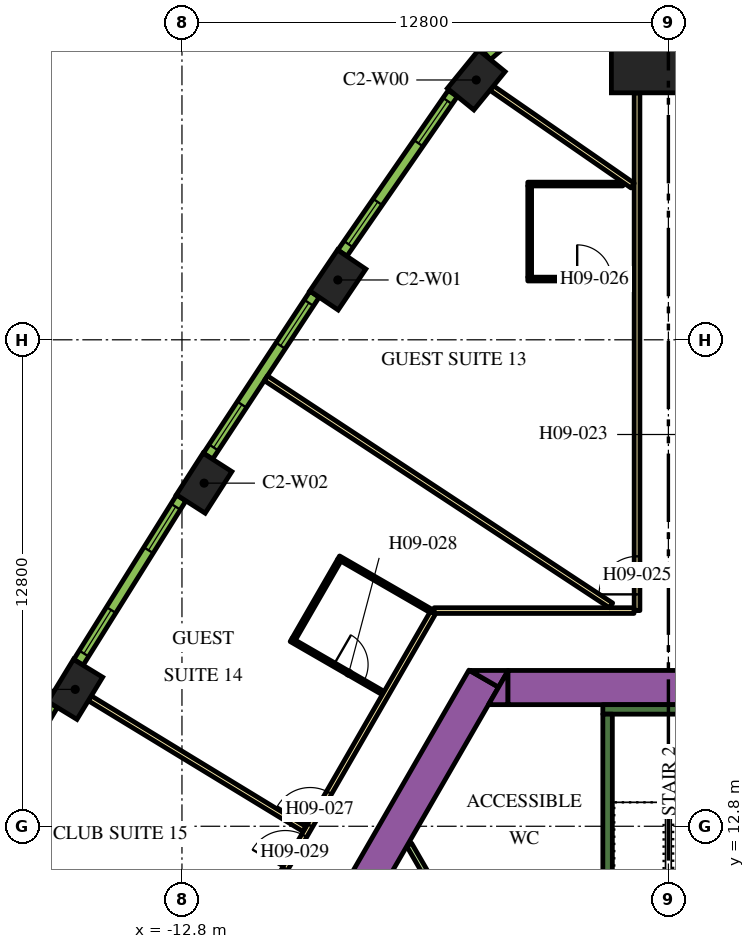
"""IFC4 building model, lengths in metres.
Left out: names, types, materials, properties, quantities, classifications, styles, units other than length and angle.
Written with IfcOpenShell. Run it as: python <this file> out.ifc"""

import sys

from ifc_helpers import new_model, si_unit, direction, frame, frame_2d, origin, origin_2d, place, context, subcontext, project, spatial, polyline, rectangle, outline, extrude, element, fill, save


model = new_model("IFC4")
c1 = context("Model", 3, precision=1e-05, world=origin(), true_north=direction((0.0, 1.0)))
c2 = subcontext(c1, "Body", "Model", "MODEL_VIEW")
j1 = project(units=[si_unit("LENGTHUNIT", "METRE"), si_unit("PLANEANGLEUNIT", "RADIAN")], contexts=[c1])
p1 = place(None, origin())
s1 = spatial("IfcSite", under=j1, at=p1, CompositionType="ELEMENT")
p2 = place(p1, origin())
s2 = spatial("IfcBuilding", under=s1, at=p2, CompositionType="ELEMENT")
p3 = place(p2, frame((0.0, 0.0, 118.8)))
s3 = spatial("IfcBuildingStorey", under=s2, at=p3, CompositionType="ELEMENT", Elevation=118.8)
p4 = place(p3, frame((0.0, 33.598, 0.0), z_axis=(0.0, 0.0, 1.0), x_axis=(0.0, 1.0, 0.0)))
e1 = element("IfcColumn", 1, at=p4, inside=s3, PredefinedType="COLUMN", context=c2, shape_type="SweptSolid", body=[
    extrude(rectangle(XDim=3.0, YDim=3.0, at=origin_2d()), origin(), (0.0, 0.0, 1.0), 3.9),
])
for number, where, z_axis, x_axis in (
    (2, (-5.056, 32.437, 0.0), (0.0, 0.0, 1.0), (-0.632, -0.775, 0.0)),
    (3, (-8.699, 27.174, 0.0), (0.0, 0.0, 1.0), (-0.559, -0.829, 0.0)),
    (4, (-12.217, 21.828, 0.0), (0.0, 0.0, 1.0), (-0.54, -0.842, 0.0)),
    (5, (-15.609, 16.402, 0.0), (0.0, 0.0, 1.0), (-0.52, -0.854, 0.0)),
):
    element("IfcColumn", number, at=place(p3, frame(where, z_axis=z_axis, x_axis=x_axis)), inside=s3, PredefinedType="COLUMN", context=c2, shape_type="SweptSolid", body=[
        extrude(rectangle(XDim=1.3, YDim=0.9, at=origin_2d()), origin(), (0.0, 0.0, 1.0), 3.9),
    ])
p5 = place(p3, frame((-15.36, -1.503, 0.0), z_axis=(0.0, 0.0, 1.0), x_axis=(0.50000389221, 0.866023156604, 0.0)))
e6 = element("IfcWall", 6, at=p5, inside=s3, PredefinedType="SOLIDWALL", context=c2, shape_type="SweptSolid", body=[
    extrude(rectangle(XDim=21.0, YDim=0.9, at=frame_2d((10.5, 0.0))), origin(), (0.0, 0.0, 1.0), 3.9),
])
p6 = place(p3, origin())
e7 = element("IfcWall", 7, at=p6, inside=s3, PredefinedType="SOLIDWALL", context=c2, shape_type="SweptSolid", body=[
    extrude(outline(polyline([(-4.215, 16.9), (-4.469, 16.46), (-5.231, 16.9), (-4.215, 16.9)])), origin(), (0.0, 0.0, 1.0), 3.9),
])
p7 = place(p3, frame((-4.224, 16.45, 0.0), z_axis=(0.0, 0.0, 1.0), x_axis=(1.0, 0.0, 0.0)))
e8 = element("IfcWall", 8, at=p7, inside=s3, PredefinedType="SOLIDWALL", context=c2, shape_type="SweptSolid", body=[
    extrude(rectangle(XDim=9.488, YDim=0.9, at=frame_2d((4.744, 0.0))), origin(), (0.0, 0.0, 1.0), 3.9),
])
e9 = element("IfcWall", 9, at=p6, inside=s3, PredefinedType="SOLIDWALL", context=c2, shape_type="SweptSolid", body=[
    extrude(outline(polyline([(-4.734, 16.0), (-4.226, 16.88), (-4.226, 16.0), (-4.734, 16.0)])), origin(), (0.0, 0.0, 1.0), 3.9),
])
p8 = place(p3, frame((-1.725, 15.875, 0.0), z_axis=(0.0, 0.0, 1.0), x_axis=(1.0, 0.0, 0.0)))
e10 = element("IfcWall", 10, at=p8, inside=s3, PredefinedType="SOLIDWALL", context=c2, shape_type="SweptSolid", body=[
    extrude(rectangle(XDim=3.45, YDim=0.25, at=frame_2d((1.725, 0.0))), origin(), (0.0, 0.0, 1.0), 3.9),
])
p9 = place(p3, frame((-1.6, 8.7, 0.0), z_axis=(0.0, 0.0, 1.0), x_axis=(0.0, 1.0, 0.0)))
e11 = element("IfcWall", 11, at=p9, inside=s3, PredefinedType="SOLIDWALL", context=c2, shape_type="SweptSolid", body=[
    extrude(rectangle(XDim=7.05, YDim=0.25, at=frame_2d((3.525, 0.0))), origin(), (0.0, 0.0, 1.0), 3.9),
])
p10 = place(p3, frame((-6.823, 12.318, 0.0), z_axis=(0.0, 0.0, 1.0), x_axis=(0.500007885066, -0.866020851292, 0.0)))
e12 = element("IfcWall", 12, at=p10, inside=s3, PredefinedType="PARTITIONING", context=c2, shape_type="SweptSolid", body=[
    extrude(rectangle(XDim=4.072, YDim=0.15, at=frame_2d((2.036, 0.0))), origin(), (0.0, 0.0, 1.0), 2.75),
])
p11 = place(p3, frame((-0.825, 18.475, 0.0), z_axis=(0.0, 0.0, 1.0), x_axis=(0.0, 1.0, 0.0)))
e13 = element("IfcWall", 13, at=p11, inside=s3, PredefinedType="PARTITIONING", context=c2, shape_type="SweptSolid", body=[
    extrude(rectangle(XDim=13.623, YDim=0.15, at=frame_2d((6.812, 0.0))), origin(), (0.0, 0.0, 1.0), 2.75),
])
p12 = place(p11, frame((0.427, 0.0, 0.0)))
e14 = element("IfcOpeningElement", 14, at=p12, cuts=e13, PredefinedType="OPENING", context=c2, shape_type="SweptSolid", body=[
    extrude(rectangle(XDim=1.0, YDim=2.1, at=frame_2d((0.5, 1.05))), frame((0.0, 0.085, 0.0), z_axis=(0.0, -1.0, 0.0), x_axis=(1.0, 0.0, 0.0)), (0.0, 0.0, 1.0), 0.17),
])
p13 = place(p3, frame((-6.163, 18.475, 0.0), z_axis=(0.0, 0.0, 1.0), x_axis=(1.0, 0.0, 0.0)))
e15 = element("IfcWall", 15, at=p13, inside=s3, PredefinedType="PARTITIONING", context=c2, shape_type="SweptSolid", body=[
    extrude(rectangle(XDim=5.258, YDim=0.15, at=frame_2d((2.629, 0.0))), origin(), (0.0, 0.0, 1.0), 2.75),
])
p14 = place(p3, frame((-19.081, -3.9, 0.0), z_axis=(0.0, 0.0, 1.0), x_axis=(0.499998313975, 0.866026377209, 0.0)))
e16 = element("IfcWall", 16, at=p14, inside=s3, PredefinedType="PARTITIONING", context=c2, shape_type="SweptSolid", body=[
    extrude(rectangle(XDim=25.766, YDim=0.15, at=frame_2d((12.883, 0.0))), origin(), (0.0, 0.0, 1.0), 2.75),
])
p15 = place(p14, frame((19.306, 0.0, 0.0)))
e17 = element("IfcOpeningElement", 17, at=p15, cuts=e16, PredefinedType="OPENING", context=c2, shape_type="SweptSolid", body=[
    extrude(rectangle(XDim=1.0, YDim=2.1, at=frame_2d((0.5, 1.05))), frame((0.0, 0.085, 0.0), z_axis=(0.0, -1.0, 0.0), x_axis=(1.0, 0.0, 0.0)), (0.0, 0.0, 1.0), 0.17),
])
p16 = place(p14, frame((18.0, 0.0, 0.0)))
e18 = element("IfcOpeningElement", 18, at=p16, cuts=e16, PredefinedType="OPENING", context=c2, shape_type="SweptSolid", body=[
    extrude(rectangle(XDim=1.0, YDim=2.1, at=frame_2d((0.5, 1.05))), frame((0.0, 0.085, 0.0), z_axis=(0.0, -1.0, 0.0), x_axis=(1.0, 0.0, 0.0)), (0.0, 0.0, 1.0), 0.17),
])
p17 = place(p14, frame((7.793, 0.0, 0.0)))
e19 = element("IfcOpeningElement", 19, at=p17, cuts=e16, PredefinedType="OPENING", context=c2, shape_type="SweptSolid", body=[
    extrude(rectangle(XDim=0.9, YDim=2.1, at=frame_2d((0.45, 1.05))), frame((0.0, 0.085, 0.0), z_axis=(0.0, -1.0, 0.0), x_axis=(1.0, 0.0, 0.0)), (0.0, 0.0, 1.0), 0.17),
])
p18 = place(p14, frame((4.674, 0.0, 0.0)))
e20 = element("IfcOpeningElement", 20, at=p18, cuts=e16, PredefinedType="OPENING", context=c2, shape_type="SweptSolid", body=[
    extrude(rectangle(XDim=0.9, YDim=2.1, at=frame_2d((0.45, 1.05))), frame((0.0, 0.085, 0.0), z_axis=(0.0, -1.0, 0.0), x_axis=(1.0, 0.0, 0.0)), (0.0, 0.0, 1.0), 0.17),
])
p19 = place(p14, frame((0.18, 0.0, 0.0)))
e21 = element("IfcOpeningElement", 21, at=p19, cuts=e16, PredefinedType="OPENING", context=c2, shape_type="SweptSolid", body=[
    extrude(rectangle(XDim=1.0, YDim=2.1, at=frame_2d((0.5, 1.05))), frame((0.0, 0.085, 0.0), z_axis=(0.0, -1.0, 0.0), x_axis=(1.0, 0.0, 0.0)), (0.0, 0.0, 1.0), 0.17),
])
p20 = place(p3, frame((-15.225, 16.167, 0.0), z_axis=(0.0, 0.0, 1.0), x_axis=(0.854088713274, -0.520127359266, 0.0)))
e22 = element("IfcWall", 22, at=p20, inside=s3, PredefinedType="PARTITIONING", context=c2, shape_type="SweptSolid", body=[
    extrude(rectangle(XDim=6.611, YDim=0.15, at=frame_2d((3.305, 0.0))), origin(), (0.0, 0.0, 1.0), 2.75),
])
p21 = place(p3, frame((-10.592, 24.589, 0.0), z_axis=(0.0, 0.0, 1.0), x_axis=(0.835337323748, -0.549737715236, 0.0)))
e23 = element("IfcWall", 23, at=p21, inside=s3, PredefinedType="PARTITIONING", context=c2, shape_type="SweptSolid", body=[
    extrude(rectangle(XDim=10.875, YDim=0.15, at=frame_2d((5.438, 0.0))), origin(), (0.0, 0.0, 1.0), 2.75),
])
p22 = place(p3, frame((-4.649, 32.223, 0.0), z_axis=(0.0, 0.0, 1.0), x_axis=(0.822262349475, -0.569108626394, 0.0)))
e24 = element("IfcWall", 24, at=p22, inside=s3, PredefinedType="PARTITIONING", context=c2, shape_type="SweptSolid", body=[
    extrude(rectangle(XDim=4.51, YDim=0.15, at=frame_2d((2.255, 0.0))), origin(), (0.0, 0.0, 1.0), 2.75),
])
p23 = place(p3, frame((-3.7, 27.198, 0.0), z_axis=(0.0, 0.0, 1.0), x_axis=(1.0, 0.0, 0.0)))
e25 = element("IfcWall", 25, at=p23, inside=s3, PredefinedType="PARTITIONING", context=c2, shape_type="SweptSolid", body=[
    extrude(rectangle(XDim=2.8, YDim=0.1, at=frame_2d((1.4, 0.0))), origin(), (0.0, 0.0, 1.0), 2.75),
])
p24 = place(p23, frame((1.3, 0.0, 0.0)))
e26 = element("IfcOpeningElement", 26, at=p24, cuts=e25, PredefinedType="OPENING", context=c2, shape_type="SweptSolid", body=[
    extrude(rectangle(XDim=0.9, YDim=2.1, at=frame_2d((0.45, 1.05))), frame((0.0, 0.06, 0.0), z_axis=(0.0, -1.0, 0.0), x_axis=(1.0, 0.0, 0.0)), (0.0, 0.0, 1.0), 0.12),
])
p25 = place(p3, frame((-3.65, 27.248, 0.0), z_axis=(0.0, 0.0, 1.0), x_axis=(0.0, 1.0, 0.0)))
e27 = element("IfcWall", 27, at=p25, inside=s3, PredefinedType="PARTITIONING", context=c2, shape_type="SweptSolid", body=[
    extrude(rectangle(XDim=2.4, YDim=0.1, at=frame_2d((1.2, 0.0))), origin(), (0.0, 0.0, 1.0), 2.75),
])
p26 = place(p3, frame((-1.2, 29.698, 0.0), z_axis=(0.0, 0.0, 1.0), x_axis=(-1.0, 0.0, 0.0)))
e28 = element("IfcWall", 28, at=p26, inside=s3, PredefinedType="PARTITIONING", context=c2, shape_type="SweptSolid", body=[
    extrude(rectangle(XDim=2.5, YDim=0.1, at=frame_2d((1.25, 0.0))), origin(), (0.0, 0.0, 1.0), 2.75),
])
p27 = place(p3, frame((-9.928, 17.704, 0.0), z_axis=(0.0, 0.0, 1.0), x_axis=(0.866034573852, -0.49998411664, 0.0)))
e29 = element("IfcWall", 29, at=p27, inside=s3, PredefinedType="PARTITIONING", context=c2, shape_type="SweptSolid", body=[
    extrude(rectangle(XDim=2.8, YDim=0.1, at=frame_2d((1.4, 0.0))), origin(), (0.0, 0.0, 1.0), 2.75),
])
p28 = place(p27, frame((1.3, 0.0, 0.0)))
e30 = element("IfcOpeningElement", 30, at=p28, cuts=e29, PredefinedType="OPENING", context=c2, shape_type="SweptSolid", body=[
    extrude(rectangle(XDim=0.9, YDim=2.1, at=frame_2d((0.45, 1.05))), frame((0.0, 0.06, 0.0), z_axis=(0.0, -1.0, 0.0), x_axis=(1.0, 0.0, 0.0)), (0.0, 0.0, 1.0), 0.12),
])
p29 = place(p3, frame((-9.86, 17.722, 0.0), z_axis=(0.0, 0.0, 1.0), x_axis=(0.500001309137, 0.866024647952, 0.0)))
e31 = element("IfcWall", 31, at=p29, inside=s3, PredefinedType="PARTITIONING", context=c2, shape_type="SweptSolid", body=[
    extrude(rectangle(XDim=2.4, YDim=0.1, at=frame_2d((1.2, 0.0))), origin(), (0.0, 0.0, 1.0), 2.75),
])
p30 = place(p3, frame((-6.253, 18.469, 0.0), z_axis=(0.0, 0.0, 1.0), x_axis=(-0.866034573852, 0.49998411664, 0.0)))
e32 = element("IfcWall", 32, at=p30, inside=s3, PredefinedType="PARTITIONING", context=c2, shape_type="SweptSolid", body=[
    extrude(rectangle(XDim=2.8, YDim=0.1, at=frame_2d((1.4, 0.0))), origin(), (0.0, 0.0, 1.0), 2.75),
])
p31 = place(p3, frame((-3.405, 34.275, 0.0), z_axis=(0.0, 0.0, 1.0), x_axis=(-0.754882764627, -0.655859749999, 0.0)))
e33 = element("IfcWall", 33, at=p31, inside=s3, PredefinedType="SOLIDWALL", context=c2, shape_type="SweptSolid", body=[
    extrude(rectangle(XDim=1.82, YDim=0.29, at=frame_2d((0.91, 0.0))), origin(), (0.0, 0.0, 1.0), 3.65),
])
p32 = place(p31, frame((0.46, 0.0, 0.9)))
e34 = element("IfcOpeningElement", 34, at=p32, cuts=e33, PredefinedType="OPENING", context=c2, shape_type="SweptSolid", body=[
    extrude(rectangle(XDim=0.9, YDim=2.15, at=frame_2d((0.45, 1.075))), frame((0.0, 0.155, 0.0), z_axis=(0.0, -1.0, 0.0), x_axis=(1.0, 0.0, 0.0)), (0.0, 0.0, 1.0), 0.31),
])
p33 = place(p3, frame((-5.673, 32.081, 0.0), z_axis=(0.0, 0.0, 1.0), x_axis=(-0.569113019126, -0.822259309136, 0.0)))
e35 = element("IfcWall", 35, at=p33, inside=s3, PredefinedType="SOLIDWALL", context=c2, shape_type="SweptSolid", body=[
    extrude(rectangle(XDim=5.107, YDim=0.29, at=frame_2d((2.553, 0.0))), origin(), (0.0, 0.0, 1.0), 3.65),
])
p34 = place(p33, frame((0.24, 0.0, 0.9)))
e36 = element("IfcOpeningElement", 36, at=p34, cuts=e35, PredefinedType="OPENING", context=c2, shape_type="SweptSolid", body=[
    extrude(rectangle(XDim=1.35, YDim=2.15, at=frame_2d((0.675, 1.075))), frame((0.0, 0.155, 0.0), z_axis=(0.0, -1.0, 0.0), x_axis=(1.0, 0.0, 0.0)), (0.0, 0.0, 1.0), 0.31),
])
p35 = place(p33, frame((3.471, 0.0, 0.9)))
e37 = element("IfcOpeningElement", 37, at=p35, cuts=e35, PredefinedType="OPENING", context=c2, shape_type="SweptSolid", body=[
    extrude(rectangle(XDim=1.35, YDim=2.15, at=frame_2d((0.675, 1.075))), frame((0.0, 0.155, 0.0), z_axis=(0.0, -1.0, 0.0), x_axis=(1.0, 0.0, 0.0)), (0.0, 0.0, 1.0), 0.31),
])
p36 = place(p3, frame((-9.311, 26.799, 0.0), z_axis=(0.0, 0.0, 1.0), x_axis=(-0.549741341923, -0.835334937005, 0.0)))
e38 = element("IfcWall", 38, at=p36, inside=s3, PredefinedType="SOLIDWALL", context=c2, shape_type="SweptSolid", body=[
    extrude(rectangle(XDim=5.1, YDim=0.29, at=frame_2d((2.55, 0.0))), origin(), (0.0, 0.0, 1.0), 3.65),
])
p37 = place(p36, frame((0.273, 0.0, 0.9)))
e39 = element("IfcOpeningElement", 39, at=p37, cuts=e38, PredefinedType="OPENING", context=c2, shape_type="SweptSolid", body=[
    extrude(rectangle(XDim=1.35, YDim=2.15, at=frame_2d((0.675, 1.075))), frame((0.0, 0.155, 0.0), z_axis=(0.0, -1.0, 0.0), x_axis=(1.0, 0.0, 0.0)), (0.0, 0.0, 1.0), 0.31),
])
p38 = place(p36, frame((3.478, 0.0, 0.9)))
e40 = element("IfcOpeningElement", 40, at=p38, cuts=e38, PredefinedType="OPENING", context=c2, shape_type="SweptSolid", body=[
    extrude(rectangle(XDim=1.35, YDim=2.15, at=frame_2d((0.675, 1.075))), frame((0.0, 0.155, 0.0), z_axis=(0.0, -1.0, 0.0), x_axis=(1.0, 0.0, 0.0)), (0.0, 0.0, 1.0), 0.31),
])
p39 = place(p3, frame((-12.82, 21.439, 0.0), z_axis=(0.0, 0.0, 1.0), x_axis=(-0.530072082134, -0.847952585787, 0.0)))
e41 = element("IfcWall", 41, at=p39, inside=s3, PredefinedType="SOLIDWALL", context=c2, shape_type="SweptSolid", body=[
    extrude(rectangle(XDim=5.1, YDim=0.29, at=frame_2d((2.55, 0.0))), origin(), (0.0, 0.0, 1.0), 3.65),
])
p40 = place(p39, frame((0.273, 0.0, 0.9)))
e42 = element("IfcOpeningElement", 42, at=p40, cuts=e41, PredefinedType="OPENING", context=c2, shape_type="SweptSolid", body=[
    extrude(rectangle(XDim=1.35, YDim=2.15, at=frame_2d((0.675, 1.075))), frame((0.0, 0.155, 0.0), z_axis=(0.0, -1.0, 0.0), x_axis=(1.0, 0.0, 0.0)), (0.0, 0.0, 1.0), 0.31),
])
p41 = place(p39, frame((3.478, 0.0, 0.9)))
e43 = element("IfcOpeningElement", 43, at=p41, cuts=e41, PredefinedType="OPENING", context=c2, shape_type="SweptSolid", body=[
    extrude(rectangle(XDim=1.35, YDim=2.15, at=frame_2d((0.675, 1.075))), frame((0.0, 0.155, 0.0), z_axis=(0.0, -1.0, 0.0), x_axis=(1.0, 0.0, 0.0)), (0.0, 0.0, 1.0), 0.31),
])
p42 = place(p3, frame((-16.203, 15.998, 0.0), z_axis=(0.0, 0.0, 1.0), x_axis=(-0.510054281659, -0.860142214847, 0.0)))
e44 = element("IfcWall", 44, at=p42, inside=s3, PredefinedType="SOLIDWALL", context=c2, shape_type="SweptSolid", body=[
    extrude(rectangle(XDim=5.101, YDim=0.29, at=frame_2d((2.55, 0.0))), origin(), (0.0, 0.0, 1.0), 3.65),
])
p43 = place(p42, frame((0.273, 0.0, 0.9)))
e45 = element("IfcOpeningElement", 45, at=p43, cuts=e44, PredefinedType="OPENING", context=c2, shape_type="SweptSolid", body=[
    extrude(rectangle(XDim=1.35, YDim=2.15, at=frame_2d((0.675, 1.075))), frame((0.0, 0.155, 0.0), z_axis=(0.0, -1.0, 0.0), x_axis=(1.0, 0.0, 0.0)), (0.0, 0.0, 1.0), 0.31),
])
p44 = place(p42, frame((3.478, 0.0, 0.9)))
e46 = element("IfcOpeningElement", 46, at=p44, cuts=e44, PredefinedType="OPENING", context=c2, shape_type="SweptSolid", body=[
    extrude(rectangle(XDim=1.35, YDim=2.15, at=frame_2d((0.675, 1.075))), frame((0.0, 0.155, 0.0), z_axis=(0.0, -1.0, 0.0), x_axis=(1.0, 0.0, 0.0)), (0.0, 0.0, 1.0), 0.31),
])
p45 = place(p12, origin())
e47 = element("IfcDoor", 47, at=p45, inside=s3, OperationType="SINGLE_SWING_LEFT", PredefinedType="DOOR", context=c2, shape_type="SweptSolid", body=[
    extrude(rectangle(XDim=1.0, YDim=2.1, at=frame_2d((0.5, 1.05))), frame((0.0, 0.025, 0.0), z_axis=(0.0, -1.0, 0.0), x_axis=(1.0, 0.0, 0.0)), (0.0, 0.0, 1.0), 0.05),
])
fill(e14, e47)
p46 = place(p24, origin())
e48 = element("IfcDoor", 48, at=p46, inside=s3, OperationType="SINGLE_SWING_LEFT", PredefinedType="DOOR", context=c2, shape_type="SweptSolid", body=[
    extrude(rectangle(XDim=0.9, YDim=2.1, at=frame_2d((0.45, 1.05))), frame((0.0, 0.025, 0.0), z_axis=(0.0, -1.0, 0.0), x_axis=(1.0, 0.0, 0.0)), (0.0, 0.0, 1.0), 0.05),
])
fill(e26, e48)
p47 = place(p15, origin())
e49 = element("IfcDoor", 49, at=p47, inside=s3, OperationType="SINGLE_SWING_LEFT", PredefinedType="DOOR", context=c2, shape_type="SweptSolid", body=[
    extrude(rectangle(XDim=1.0, YDim=2.1, at=frame_2d((0.5, 1.05))), frame((0.0, 0.025, 0.0), z_axis=(0.0, -1.0, 0.0), x_axis=(1.0, 0.0, 0.0)), (0.0, 0.0, 1.0), 0.05),
])
fill(e17, e49)
p48 = place(p28, origin())
e50 = element("IfcDoor", 50, at=p48, inside=s3, OperationType="SINGLE_SWING_LEFT", PredefinedType="DOOR", context=c2, shape_type="SweptSolid", body=[
    extrude(rectangle(XDim=0.9, YDim=2.1, at=frame_2d((0.45, 1.05))), frame((0.0, 0.025, 0.0), z_axis=(0.0, -1.0, 0.0), x_axis=(1.0, 0.0, 0.0)), (0.0, 0.0, 1.0), 0.05),
])
fill(e30, e50)
p49 = place(p16, origin())
e51 = element("IfcDoor", 51, at=p49, inside=s3, OperationType="SINGLE_SWING_RIGHT", PredefinedType="DOOR", context=c2, shape_type="SweptSolid", body=[
    extrude(rectangle(XDim=1.0, YDim=2.1, at=frame_2d((0.5, 1.05))), frame((0.0, 0.025, 0.0), z_axis=(0.0, -1.0, 0.0), x_axis=(1.0, 0.0, 0.0)), (0.0, 0.0, 1.0), 0.05),
])
fill(e18, e51)
p50 = place(p34, origin())
e52 = element("IfcWindow", 52, at=p50, inside=s3, PartitioningType="DOUBLE_PANEL_VERTICAL", PredefinedType="WINDOW", context=c2, shape_type="SweptSolid", body=[
    extrude(rectangle(XDim=1.35, YDim=2.15, at=frame_2d((0.675, 1.075))), frame((0.0, 0.015, 0.0), z_axis=(0.0, -1.0, 0.0), x_axis=(1.0, 0.0, 0.0)), (0.0, 0.0, 1.0), 0.06),
])
fill(e36, e52)
p51 = place(p35, origin())
e53 = element("IfcWindow", 53, at=p51, inside=s3, PartitioningType="DOUBLE_PANEL_VERTICAL", PredefinedType="WINDOW", context=c2, shape_type="SweptSolid", body=[
    extrude(rectangle(XDim=1.35, YDim=2.15, at=frame_2d((0.675, 1.075))), frame((0.0, 0.015, 0.0), z_axis=(0.0, -1.0, 0.0), x_axis=(1.0, 0.0, 0.0)), (0.0, 0.0, 1.0), 0.06),
])
fill(e37, e53)
p52 = place(p37, origin())
e54 = element("IfcWindow", 54, at=p52, inside=s3, PartitioningType="DOUBLE_PANEL_VERTICAL", PredefinedType="WINDOW", context=c2, shape_type="SweptSolid", body=[
    extrude(rectangle(XDim=1.35, YDim=2.15, at=frame_2d((0.675, 1.075))), frame((0.0, 0.015, 0.0), z_axis=(0.0, -1.0, 0.0), x_axis=(1.0, 0.0, 0.0)), (0.0, 0.0, 1.0), 0.06),
])
fill(e39, e54)
p53 = place(p38, origin())
e55 = element("IfcWindow", 55, at=p53, inside=s3, PartitioningType="DOUBLE_PANEL_VERTICAL", PredefinedType="WINDOW", context=c2, shape_type="SweptSolid", body=[
    extrude(rectangle(XDim=1.35, YDim=2.15, at=frame_2d((0.675, 1.075))), frame((0.0, 0.015, 0.0), z_axis=(0.0, -1.0, 0.0), x_axis=(1.0, 0.0, 0.0)), (0.0, 0.0, 1.0), 0.06),
])
fill(e40, e55)
p54 = place(p40, origin())
e56 = element("IfcWindow", 56, at=p54, inside=s3, PartitioningType="DOUBLE_PANEL_VERTICAL", PredefinedType="WINDOW", context=c2, shape_type="SweptSolid", body=[
    extrude(rectangle(XDim=1.35, YDim=2.15, at=frame_2d((0.675, 1.075))), frame((0.0, 0.015, 0.0), z_axis=(0.0, -1.0, 0.0), x_axis=(1.0, 0.0, 0.0)), (0.0, 0.0, 1.0), 0.06),
])
fill(e42, e56)
p55 = place(p41, origin())
e57 = element("IfcWindow", 57, at=p55, inside=s3, PartitioningType="DOUBLE_PANEL_VERTICAL", PredefinedType="WINDOW", context=c2, shape_type="SweptSolid", body=[
    extrude(rectangle(XDim=1.35, YDim=2.15, at=frame_2d((0.675, 1.075))), frame((0.0, 0.015, 0.0), z_axis=(0.0, -1.0, 0.0), x_axis=(1.0, 0.0, 0.0)), (0.0, 0.0, 1.0), 0.06),
])
fill(e43, e57)
save(model, sys.argv[1])
